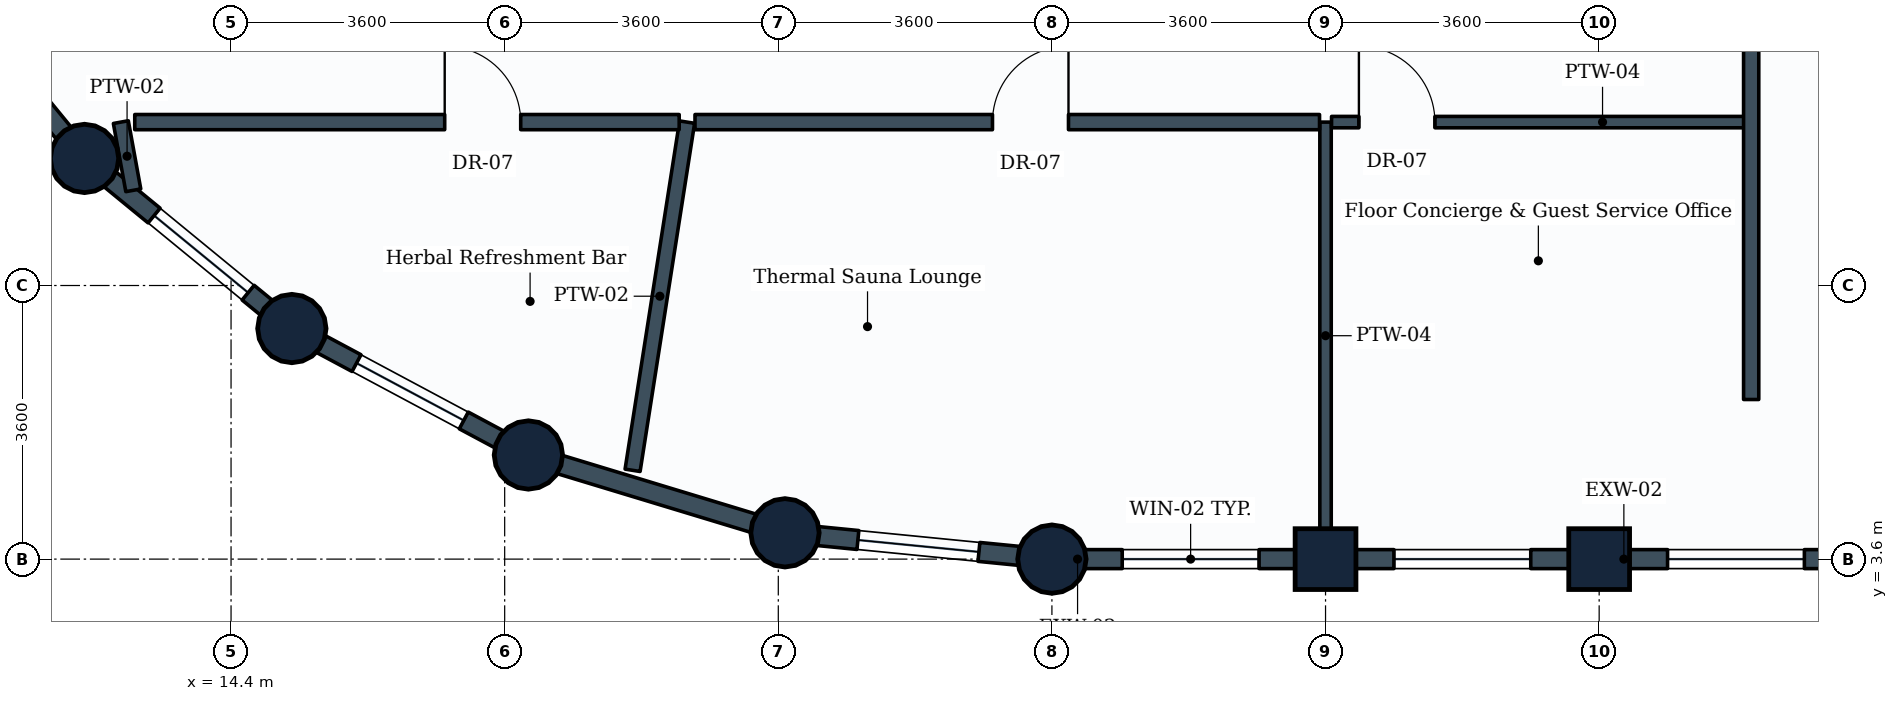
"""IFC4 building model, lengths in metres.
Left out: names, types, materials, properties, quantities, classifications, styles, units other than length and angle.
Written with IfcOpenShell. Run it as: python <this file> out.ifc"""

import sys

from ifc_helpers import new_model, si_unit, direction, frame, frame_2d, origin, origin_2d, place, context, subcontext, project, spatial, rectangle, circle, extrude, element, fill, save


model = new_model("IFC4")
c1 = context("Model", 3, precision=1e-05, world=origin(), true_north=direction((0.0, 1.0)))
c2 = subcontext(c1, "Body", "Model", "MODEL_VIEW")
j1 = project(units=[si_unit("LENGTHUNIT", "METRE"), si_unit("PLANEANGLEUNIT", "RADIAN")], contexts=[c1])
p1 = place(None, origin())
s1 = spatial("IfcSite", under=j1, at=p1, CompositionType="ELEMENT")
p2 = place(p1, origin())
s2 = spatial("IfcBuilding", under=s1, at=p2, CompositionType="ELEMENT")
p3 = place(p2, frame((0.0, 0.0, 235.4)))
s3 = spatial("IfcBuildingStorey", under=s2, at=p3, CompositionType="ELEMENT", Elevation=235.4)
for number, where, z_axis, x_axis in (
    (1, (12.472, 8.872, 0.0), (0.0, 0.0, 1.0), (1.0, 0.0, 0.0)),
    (2, (15.2, 6.634, 0.0), (0.0, 0.0, 1.0), (1.0, 0.0, 0.0)),
    (3, (18.312, 4.97, 0.0), (0.0, 0.0, 1.0), (1.0, 0.0, 0.0)),
    (4, (21.688, 3.946, 0.0), (0.0, 0.0, 1.0), (1.0, 0.0, 0.0)),
    (5, (25.2, 3.6, 0.0), (0.0, 0.0, 1.0), (1.0, 0.0, 0.0)),
):
    element("IfcColumn", number, at=place(p3, frame(where, z_axis=z_axis, x_axis=x_axis)), inside=s3, PredefinedType="COLUMN", context=c2, shape_type="SweptSolid", body=[
        extrude(circle(Radius=0.45, at=origin_2d()), origin(), (0.0, 0.0, 1.0), 3.6),
    ])
for number, where, z_axis, x_axis in (
    (6, (28.8, 3.6, 0.0), (0.0, 0.0, 1.0), (1.0, 0.0, 0.0)),
    (7, (32.4, 3.6, 0.0), (0.0, 0.0, 1.0), (1.0, 0.0, 0.0)),
):
    element("IfcColumn", number, at=place(p3, frame(where, z_axis=z_axis, x_axis=x_axis)), inside=s3, PredefinedType="COLUMN", context=c2, shape_type="SweptSolid", body=[
        extrude(rectangle(XDim=0.8, YDim=0.8, at=origin_2d()), origin(), (0.0, 0.0, 1.0), 3.6),
    ])
p4 = place(p3, frame((28.8, 3.6, 0.0), z_axis=(0.0, 0.0, 1.0), x_axis=(-1.0, 0.0, 0.0)))
e8 = element("IfcWall", 8, at=p4, inside=s3, PredefinedType="STANDARD", context=c2, shape_type="SweptSolid", body=[
    extrude(rectangle(XDim=3.6, YDim=0.25, at=frame_2d((1.8, 0.0))), origin(), (0.0, 0.0, 1.0), 2.83),
])
p5 = place(p4, frame((0.875, 0.0, 0.85)))
e9 = element("IfcOpeningElement", 9, at=p5, cuts=e8, PredefinedType="OPENING", context=c2, shape_type="SweptSolid", body=[
    extrude(rectangle(XDim=1.8, YDim=1.35, at=frame_2d((0.9, 0.675))), frame((0.0, 0.135, 0.0), z_axis=(0.0, -1.0, 0.0), x_axis=(1.0, 0.0, 0.0)), (0.0, 0.0, 1.0), 0.27),
])
p6 = place(p3, frame((32.4, 3.6, 0.0), z_axis=(0.0, 0.0, 1.0), x_axis=(-1.0, 0.0, 0.0)))
e10 = element("IfcWall", 10, at=p6, inside=s3, PredefinedType="STANDARD", context=c2, shape_type="SweptSolid", body=[
    extrude(rectangle(XDim=3.6, YDim=0.25, at=frame_2d((1.8, 0.0))), origin(), (0.0, 0.0, 1.0), 2.83),
])
p7 = place(p6, frame((0.9, 0.0, 0.85)))
e11 = element("IfcOpeningElement", 11, at=p7, cuts=e10, PredefinedType="OPENING", context=c2, shape_type="SweptSolid", body=[
    extrude(rectangle(XDim=1.8, YDim=1.35, at=frame_2d((0.9, 0.675))), frame((0.0, 0.135, 0.0), z_axis=(0.0, -1.0, 0.0), x_axis=(1.0, 0.0, 0.0)), (0.0, 0.0, 1.0), 0.27),
])
p8 = place(p3, frame((36.0, 3.6, 0.0), z_axis=(0.0, 0.0, 1.0), x_axis=(-1.0, 0.0, 0.0)))
e12 = element("IfcWall", 12, at=p8, inside=s3, PredefinedType="STANDARD", context=c2, shape_type="SweptSolid", body=[
    extrude(rectangle(XDim=3.6, YDim=0.25, at=frame_2d((1.8, 0.0))), origin(), (0.0, 0.0, 1.0), 2.83),
])
p9 = place(p8, frame((0.9, 0.0, 0.85)))
e13 = element("IfcOpeningElement", 13, at=p9, cuts=e12, PredefinedType="OPENING", context=c2, shape_type="SweptSolid", body=[
    extrude(rectangle(XDim=1.8, YDim=1.35, at=frame_2d((0.9, 0.675))), frame((0.0, 0.135, 0.0), z_axis=(0.0, -1.0, 0.0), x_axis=(1.0, 0.0, 0.0)), (0.0, 0.0, 1.0), 0.27),
])
p10 = place(p3, frame((12.472, 8.872, 0.0), z_axis=(0.0, 0.0, 1.0), x_axis=(-0.634258295121, 0.773121216285, 0.0)))
e14 = element("IfcWall", 14, at=p10, inside=s3, PredefinedType="STANDARD", context=c2, shape_type="SweptSolid", body=[
    extrude(rectangle(XDim=3.529, YDim=0.25, at=frame_2d((1.764, 0.0))), origin(), (0.0, 0.0, 1.0), 2.83),
])
p11 = place(p10, frame((0.964, 0.0, 0.85)))
e15 = element("IfcOpeningElement", 15, at=p11, cuts=e14, PredefinedType="OPENING", context=c2, shape_type="SweptSolid", body=[
    extrude(rectangle(XDim=1.6, YDim=1.35, at=frame_2d((0.8, 0.675))), frame((0.0, 0.135, 0.0), z_axis=(0.0, -1.0, 0.0), x_axis=(1.0, 0.0, 0.0)), (0.0, 0.0, 1.0), 0.27),
])
p12 = place(p3, frame((15.2, 6.634, 0.0), z_axis=(0.0, 0.0, 1.0), x_axis=(-0.773121216285, 0.634258295121, 0.0)))
e16 = element("IfcWall", 16, at=p12, inside=s3, PredefinedType="STANDARD", context=c2, shape_type="SweptSolid", body=[
    extrude(rectangle(XDim=3.529, YDim=0.25, at=frame_2d((1.764, 0.0))), origin(), (0.0, 0.0, 1.0), 2.83),
])
p13 = place(p12, frame((0.744, 0.0, 0.85)))
e17 = element("IfcOpeningElement", 17, at=p13, cuts=e16, PredefinedType="OPENING", context=c2, shape_type="SweptSolid", body=[
    extrude(rectangle(XDim=1.6, YDim=1.35, at=frame_2d((0.8, 0.675))), frame((0.0, 0.135, 0.0), z_axis=(0.0, -1.0, 0.0), x_axis=(1.0, 0.0, 0.0)), (0.0, 0.0, 1.0), 0.27),
])
p14 = place(p3, frame((18.312, 4.97, 0.0), z_axis=(0.0, 0.0, 1.0), x_axis=(-0.881846862014, 0.471535907389, 0.0)))
e18 = element("IfcWall", 18, at=p14, inside=s3, PredefinedType="STANDARD", context=c2, shape_type="SweptSolid", body=[
    extrude(rectangle(XDim=3.529, YDim=0.25, at=frame_2d((1.765, 0.0))), origin(), (0.0, 0.0, 1.0), 2.83),
])
p15 = place(p14, frame((0.964, 0.0, 0.85)))
e19 = element("IfcOpeningElement", 19, at=p15, cuts=e18, PredefinedType="OPENING", context=c2, shape_type="SweptSolid", body=[
    extrude(rectangle(XDim=1.6, YDim=1.35, at=frame_2d((0.8, 0.675))), frame((0.0, 0.135, 0.0), z_axis=(0.0, -1.0, 0.0), x_axis=(1.0, 0.0, 0.0)), (0.0, 0.0, 1.0), 0.27),
])
p16 = place(p3, frame((21.688, 3.946, 0.0), z_axis=(0.0, 0.0, 1.0), x_axis=(-0.956953367403, 0.290241714123, 0.0)))
e20 = element("IfcWall", 20, at=p16, inside=s3, PredefinedType="STANDARD", context=c2, shape_type="SweptSolid", body=[
    extrude(rectangle(XDim=3.528, YDim=0.25, at=frame_2d((1.764, 0.0))), origin(), (0.0, 0.0, 1.0), 2.83),
])
p17 = place(p3, frame((25.2, 3.6, 0.0), z_axis=(0.0, 0.0, 1.0), x_axis=(-0.995183369056, 0.098030923459, 0.0)))
e21 = element("IfcWall", 21, at=p17, inside=s3, PredefinedType="STANDARD", context=c2, shape_type="SweptSolid", body=[
    extrude(rectangle(XDim=3.529, YDim=0.25, at=frame_2d((1.765, 0.0))), origin(), (0.0, 0.0, 1.0), 2.83),
])
p18 = place(p17, frame((0.965, 0.0, 0.85)))
e22 = element("IfcOpeningElement", 22, at=p18, cuts=e21, PredefinedType="OPENING", context=c2, shape_type="SweptSolid", body=[
    extrude(rectangle(XDim=1.6, YDim=1.35, at=frame_2d((0.8, 0.675))), frame((0.0, 0.135, 0.0), z_axis=(0.0, -1.0, 0.0), x_axis=(1.0, 0.0, 0.0)), (0.0, 0.0, 1.0), 0.27),
])
p19 = place(p3, frame((28.8, 9.35, 0.0), z_axis=(0.0, 0.0, 1.0), x_axis=(0.0, -1.0, 0.0)))
e23 = element("IfcWall", 23, at=p19, inside=s3, PredefinedType="PARTITIONING", context=c2, shape_type="SweptSolid", body=[
    extrude(rectangle(XDim=5.621, YDim=0.15, at=frame_2d((2.811, 0.0))), origin(), (0.0, 0.0, 1.0), 3.335),
])
p20 = place(p3, frame((12.95, 9.35, 0.0), z_axis=(0.0, 0.0, 1.0), x_axis=(0.179827308786, -0.983698195086, 0.0)))
e24 = element("IfcWall", 24, at=p20, inside=s3, PredefinedType="PARTITIONING", context=c2, shape_type="SweptSolid", body=[
    extrude(rectangle(XDim=0.912, YDim=0.2, at=frame_2d((0.456, 0.0))), origin(), (0.0, 0.0, 1.0), 2.83),
])
p21 = place(p3, frame((20.4, 9.35, 0.0), z_axis=(0.0, 0.0, 1.0), x_axis=(-0.154564772307, -0.987982657318, 0.0)))
e25 = element("IfcWall", 25, at=p21, inside=s3, PredefinedType="PARTITIONING", context=c2, shape_type="SweptSolid", body=[
    extrude(rectangle(XDim=4.637, YDim=0.2, at=frame_2d((2.319, 0.0))), origin(), (0.0, 0.0, 1.0), 2.83),
])
p22 = place(p3, frame((13.133, 9.35, 0.0), z_axis=(0.0, 0.0, 1.0), x_axis=(1.0, 0.0, 0.0)))
e26 = element("IfcWall", 26, at=p22, inside=s3, PredefinedType="PARTITIONING", context=c2, shape_type="SweptSolid", body=[
    extrude(rectangle(XDim=7.163, YDim=0.2, at=frame_2d((3.582, 0.0))), origin(), (0.0, 0.0, 1.0), 3.02),
])
p23 = place(p22, frame((4.078, 0.0, 0.0)))
e27 = element("IfcOpeningElement", 27, at=p23, cuts=e26, PredefinedType="OPENING", context=c2, shape_type="SweptSolid", body=[
    extrude(rectangle(XDim=1.0, YDim=2.1, at=frame_2d((0.5, 1.05))), frame((0.0, 0.11, 0.0), z_axis=(0.0, -1.0, 0.0), x_axis=(1.0, 0.0, 0.0)), (0.0, 0.0, 1.0), 0.22),
])
p24 = place(p3, frame((20.504, 9.35, 0.0), z_axis=(0.0, 0.0, 1.0), x_axis=(1.0, 0.0, 0.0)))
e28 = element("IfcWall", 28, at=p24, inside=s3, PredefinedType="PARTITIONING", context=c2, shape_type="SweptSolid", body=[
    extrude(rectangle(XDim=8.217, YDim=0.2, at=frame_2d((4.108, 0.0))), origin(), (0.0, 0.0, 1.0), 3.02),
])
p25 = place(p24, frame((3.914, 0.0, 0.0)))
e29 = element("IfcOpeningElement", 29, at=p25, cuts=e28, PredefinedType="OPENING", context=c2, shape_type="SweptSolid", body=[
    extrude(rectangle(XDim=1.0, YDim=2.1, at=frame_2d((0.5, 1.05))), frame((0.0, 0.11, 0.0), z_axis=(0.0, -1.0, 0.0), x_axis=(1.0, 0.0, 0.0)), (0.0, 0.0, 1.0), 0.22),
])
p26 = place(p3, frame((28.879, 9.35, 0.0), z_axis=(0.0, 0.0, 1.0), x_axis=(1.0, 0.0, 0.0)))
e30 = element("IfcWall", 30, at=p26, inside=s3, PredefinedType="PARTITIONING", context=c2, shape_type="SweptSolid", body=[
    extrude(rectangle(XDim=5.521, YDim=0.15, at=frame_2d((2.76, 0.0))), origin(), (0.0, 0.0, 1.0), 3.335),
])
p27 = place(p26, frame((0.36, 0.0, 0.0)))
e31 = element("IfcOpeningElement", 31, at=p27, cuts=e30, PredefinedType="OPENING", context=c2, shape_type="SweptSolid", body=[
    extrude(rectangle(XDim=1.0, YDim=2.1, at=frame_2d((0.5, 1.05))), frame((0.0, 0.085, 0.0), z_axis=(0.0, -1.0, 0.0), x_axis=(1.0, 0.0, 0.0)), (0.0, 0.0, 1.0), 0.17),
])
p28 = place(p3, frame((34.4, 5.7, 0.0), z_axis=(0.0, 0.0, 1.0), x_axis=(0.0, 1.0, 0.0)))
e32 = element("IfcWall", 32, at=p28, inside=s3, PredefinedType="PARTITIONING", context=c2, shape_type="SweptSolid", body=[
    extrude(rectangle(XDim=12.15, YDim=0.2, at=frame_2d((6.075, 0.0))), origin(), (0.0, 0.0, 1.0), 3.03),
])
p29 = place(p5, origin())
e33 = element("IfcWindow", 33, at=p29, inside=s3, PartitioningType="SINGLE_PANEL", PredefinedType="WINDOW", context=c2, shape_type="SweptSolid", body=[
    extrude(rectangle(XDim=1.8, YDim=1.35, at=frame_2d((0.9, 0.675))), frame((0.0, 0.03, 0.0), z_axis=(0.0, -1.0, 0.0), x_axis=(1.0, 0.0, 0.0)), (0.0, 0.0, 1.0), 0.06),
])
fill(e9, e33)
p30 = place(p7, origin())
e34 = element("IfcWindow", 34, at=p30, inside=s3, PartitioningType="SINGLE_PANEL", PredefinedType="WINDOW", context=c2, shape_type="SweptSolid", body=[
    extrude(rectangle(XDim=1.8, YDim=1.35, at=frame_2d((0.9, 0.675))), frame((0.0, 0.03, 0.0), z_axis=(0.0, -1.0, 0.0), x_axis=(1.0, 0.0, 0.0)), (0.0, 0.0, 1.0), 0.06),
])
fill(e11, e34)
p31 = place(p9, origin())
e35 = element("IfcWindow", 35, at=p31, inside=s3, PartitioningType="SINGLE_PANEL", PredefinedType="WINDOW", context=c2, shape_type="SweptSolid", body=[
    extrude(rectangle(XDim=1.8, YDim=1.35, at=frame_2d((0.9, 0.675))), frame((0.0, 0.03, 0.0), z_axis=(0.0, -1.0, 0.0), x_axis=(1.0, 0.0, 0.0)), (0.0, 0.0, 1.0), 0.06),
])
fill(e13, e35)
p32 = place(p13, origin())
e36 = element("IfcWindow", 36, at=p32, inside=s3, PartitioningType="SINGLE_PANEL", PredefinedType="WINDOW", context=c2, shape_type="SweptSolid", body=[
    extrude(rectangle(XDim=1.6, YDim=1.35, at=frame_2d((0.8, 0.675))), frame((0.0, 0.03, 0.0), z_axis=(0.0, -1.0, 0.0), x_axis=(1.0, 0.0, 0.0)), (0.0, 0.0, 1.0), 0.06),
])
fill(e17, e36)
p33 = place(p15, origin())
e37 = element("IfcWindow", 37, at=p33, inside=s3, PartitioningType="SINGLE_PANEL", PredefinedType="WINDOW", context=c2, shape_type="SweptSolid", body=[
    extrude(rectangle(XDim=1.6, YDim=1.35, at=frame_2d((0.8, 0.675))), frame((0.0, 0.03, 0.0), z_axis=(0.0, -1.0, 0.0), x_axis=(1.0, 0.0, 0.0)), (0.0, 0.0, 1.0), 0.06),
])
fill(e19, e37)
p34 = place(p18, origin())
e38 = element("IfcWindow", 38, at=p34, inside=s3, PartitioningType="SINGLE_PANEL", PredefinedType="WINDOW", context=c2, shape_type="SweptSolid", body=[
    extrude(rectangle(XDim=1.6, YDim=1.35, at=frame_2d((0.8, 0.675))), frame((0.0, 0.03, 0.0), z_axis=(0.0, -1.0, 0.0), x_axis=(1.0, 0.0, 0.0)), (0.0, 0.0, 1.0), 0.06),
])
fill(e22, e38)
p35 = place(p23, origin())
e39 = element("IfcDoor", 39, at=p35, inside=s3, OperationType="SINGLE_SWING_LEFT", PredefinedType="DOOR", context=c2, shape_type="SweptSolid", body=[
    extrude(rectangle(XDim=1.0, YDim=2.1, at=frame_2d((0.5, 1.05))), frame((0.0, 0.025, 0.0), z_axis=(0.0, -1.0, 0.0), x_axis=(1.0, 0.0, 0.0)), (0.0, 0.0, 1.0), 0.05),
])
fill(e27, e39)
p36 = place(p25, origin())
e40 = element("IfcDoor", 40, at=p36, inside=s3, OperationType="SINGLE_SWING_RIGHT", PredefinedType="DOOR", context=c2, shape_type="SweptSolid", body=[
    extrude(rectangle(XDim=1.0, YDim=2.1, at=frame_2d((0.5, 1.05))), frame((0.0, 0.025, 0.0), z_axis=(0.0, -1.0, 0.0), x_axis=(1.0, 0.0, 0.0)), (0.0, 0.0, 1.0), 0.05),
])
fill(e29, e40)
p37 = place(p27, origin())
e41 = element("IfcDoor", 41, at=p37, inside=s3, OperationType="SINGLE_SWING_LEFT", PredefinedType="DOOR", context=c2, shape_type="SweptSolid", body=[
    extrude(rectangle(XDim=1.0, YDim=2.1, at=frame_2d((0.5, 1.05))), frame((0.0, 0.025, 0.0), z_axis=(0.0, -1.0, 0.0), x_axis=(1.0, 0.0, 0.0)), (0.0, 0.0, 1.0), 0.05),
])
fill(e31, e41)
save(model, sys.argv[1])
